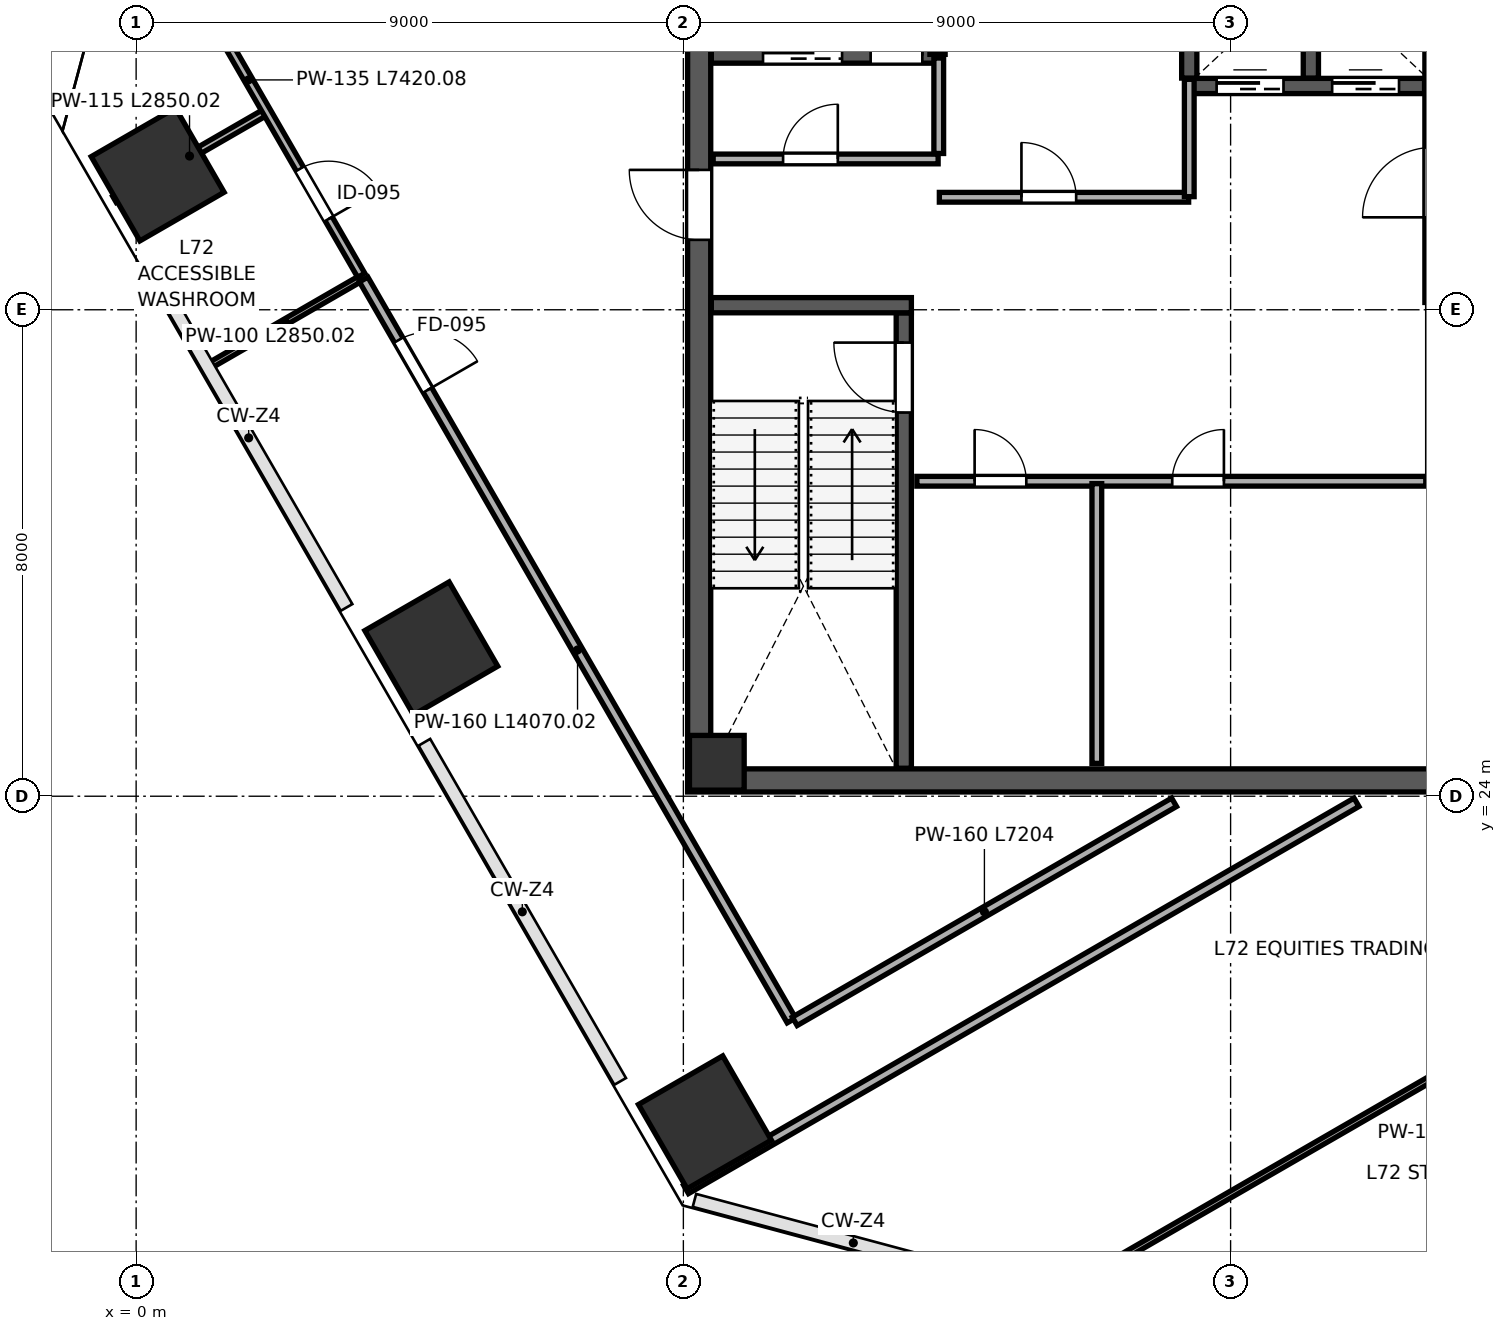
"""IFC4 building model, lengths in metres.
Left out: names, types, materials, properties, quantities, classifications, styles, units other than length and angle.
Written with IfcOpenShell. Run it as: python <this file> out.ifc"""

import sys

from ifc_helpers import new_model, si_unit, direction, frame, frame_2d, origin, origin_2d, place, context, subcontext, project, spatial, rectangle, extrude, source, transform, mapped, element, fill, save


model = new_model("IFC4")
c1 = context("Model", 3, precision=1e-05, world=origin(), true_north=direction((0.0, 1.0)))
c2 = subcontext(c1, "Body", "Model", "MODEL_VIEW")
j1 = project(units=[si_unit("LENGTHUNIT", "METRE"), si_unit("PLANEANGLEUNIT", "RADIAN")], contexts=[c1])
p1 = place(None, origin())
s1 = spatial("IfcSite", under=j1, at=p1, CompositionType="ELEMENT")
p2 = place(p1, origin())
s2 = spatial("IfcBuilding", under=s1, at=p2, CompositionType="ELEMENT")
p3 = place(p2, frame((0.0, 0.0, 319.8)))
s3 = spatial("IfcBuildingStorey", under=s2, at=p3, CompositionType="ELEMENT", Elevation=319.8)
m1 = source(origin(), c2, "Body", "SweptSolid", [
    extrude(rectangle(XDim=0.9, YDim=0.9, at=origin_2d()), origin(), (0.0, 0.0, 1.0), 4.198),
])
p4 = place(p3, frame((9.55, 24.55, 0.001), z_axis=(0.0, 0.0, 1.0), x_axis=(1.0, 0.0, 0.0)))
e1 = element("IfcColumn", 1, at=p4, inside=s3, PredefinedType="COLUMN", context=c2, shape_type="MappedRepresentation", body=[
    mapped(m1, transform((0.0, 0.0, 0.0), scale=1.0)),
])
m2 = source(origin(), c2, "Body", "SweptSolid", [
    extrude(rectangle(XDim=1.6, YDim=1.6, at=origin_2d()), origin(), (0.0, 0.0, 1.0), 4.198),
])
for number, where, z_axis, x_axis in (
    (2, (0.354, 34.225, 0.001), (0.0, 0.0, 1.0), (-0.5, 0.866, 0.0)),
    (3, (4.854, 26.431, 0.001), (0.0, 0.0, 1.0), (-0.5, 0.866, 0.0)),
    (4, (9.354, 18.637, 0.001), (0.0, 0.0, 1.0), (-0.5, 0.866, 0.0)),
    (5, (21.822, 15.443, 0.001), (0.0, 0.0, 1.0), (-0.5, 0.866, 0.0)),
):
    element("IfcColumn", number, at=place(p3, frame(where, z_axis=z_axis, x_axis=x_axis)), inside=s3, PredefinedType="COLUMN", context=c2, shape_type="MappedRepresentation", body=[
        mapped(m2, transform((0.0, 0.0, 0.0), scale=1.0)),
    ])
p5 = place(p3, frame((9.26, 24.45, 0.0), z_axis=(0.0, 0.0, 1.0), x_axis=(0.0, 1.0, 0.0)))
e6 = element("IfcWall", 6, at=p5, inside=s3, PredefinedType="SHEAR", context=c2, shape_type="SweptSolid", body=[
    extrude(rectangle(XDim=15.1, YDim=0.38, at=frame_2d((7.55, 0.0))), origin(), (0.0, 0.0, 1.0), 3.96),
])
p6 = place(p5, frame((8.7, 0.0, 0.0)))
e7 = element("IfcOpeningElement", 7, at=p6, cuts=e6, PredefinedType="OPENING", context=c2, shape_type="SweptSolid", body=[
    extrude(rectangle(XDim=1.15, YDim=2.2, at=frame_2d((0.575, 1.1))), frame((0.0, 0.2, 0.0), z_axis=(0.0, -1.0, 0.0), x_axis=(1.0, 0.0, 0.0)), (0.0, 0.0, 1.0), 0.4),
])
p7 = place(p3, frame((9.07, 24.26, 0.0), z_axis=(0.0, 0.0, 1.0), x_axis=(1.0, 0.0, 0.0)))
e8 = element("IfcWall", 8, at=p7, inside=s3, PredefinedType="SHEAR", context=c2, shape_type="SweptSolid", body=[
    extrude(rectangle(XDim=17.86, YDim=0.38, at=frame_2d((8.93, 0.0))), origin(), (0.0, 0.0, 1.0), 3.96),
])
p8 = place(p3, frame((12.625, 24.46, 0.0), z_axis=(0.0, 0.0, 1.0), x_axis=(0.0, 1.0, 0.0)))
e9 = element("IfcWall", 9, at=p8, inside=s3, PredefinedType="SHEAR", context=c2, shape_type="SweptSolid", body=[
    extrude(rectangle(XDim=7.49, YDim=0.25, at=frame_2d((3.745, 0.0))), origin(), (0.0, 0.0, 1.0), 3.96),
])
p9 = place(p8, frame((5.85, 0.0, 0.0)))
e10 = element("IfcOpeningElement", 10, at=p9, cuts=e9, PredefinedType="OPENING", context=c2, shape_type="SweptSolid", body=[
    extrude(rectangle(XDim=1.15, YDim=2.2, at=frame_2d((0.575, 1.1))), frame((0.0, 0.135, 0.0), z_axis=(0.0, -1.0, 0.0), x_axis=(1.0, 0.0, 0.0)), (0.0, 0.0, 1.0), 0.27),
])
p10 = place(p3, frame((9.46, 32.075, 0.0), z_axis=(0.0, 0.0, 1.0), x_axis=(1.0, 0.0, 0.0)))
e11 = element("IfcWall", 11, at=p10, inside=s3, PredefinedType="SHEAR", context=c2, shape_type="SweptSolid", body=[
    extrude(rectangle(XDim=3.29, YDim=0.25, at=frame_2d((1.645, 0.0))), origin(), (0.0, 0.0, 1.0), 3.96),
])
p11 = place(p3, frame((21.32, 32.12, 0.0), z_axis=(0.0, 0.0, 1.0), x_axis=(0.0, 1.0, 0.0)))
e12 = element("IfcWall", 12, at=p11, inside=s3, PredefinedType="SHEAR", context=c2, shape_type="SweptSolid", body=[
    extrude(rectangle(XDim=7.42, YDim=0.25, at=frame_2d((3.71, 0.0))), origin(), (0.0, 0.0, 1.0), 3.96),
])
p12 = place(p11, frame((1.4, 0.0, 0.0)))
e13 = element("IfcOpeningElement", 13, at=p12, cuts=e12, PredefinedType="OPENING", context=c2, shape_type="SweptSolid", body=[
    extrude(rectangle(XDim=1.15, YDim=2.2, at=frame_2d((0.575, 1.1))), frame((0.0, 0.135, 0.0), z_axis=(0.0, -1.0, 0.0), x_axis=(1.0, 0.0, 0.0)), (0.0, 0.0, 1.0), 0.27),
])
p13 = place(p3, frame((9.46, 36.18, 0.0), z_axis=(0.0, 0.0, 1.0), x_axis=(1.0, 0.0, 0.0)))
e14 = element("IfcWall", 14, at=p13, inside=s3, PredefinedType="SHEAR", context=c2, shape_type="SweptSolid", body=[
    extrude(rectangle(XDim=3.79, YDim=0.25, at=frame_2d((1.895, 0.0))), origin(), (0.0, 0.0, 1.0), 3.96),
])
p14 = place(p13, frame((2.62, 0.0, 0.0)))
e15 = element("IfcOpeningElement", 15, at=p14, cuts=e14, PredefinedType="OPENING", context=c2, shape_type="SweptSolid", body=[
    extrude(rectangle(XDim=0.85, YDim=2.1, at=frame_2d((0.425, 1.05))), frame((0.0, 0.135, 0.0), z_axis=(0.0, -1.0, 0.0), x_axis=(1.0, 0.0, 0.0)), (0.0, 0.0, 1.0), 0.27),
])
p15 = place(p13, frame((0.85, 0.0, 0.0)))
e16 = element("IfcOpeningElement", 16, at=p15, cuts=e14, PredefinedType="OPENING", context=c2, shape_type="SweptSolid", body=[
    extrude(rectangle(XDim=1.3, YDim=2.25, at=frame_2d((0.65, 1.125))), frame((0.0, 0.135, 0.0), z_axis=(0.0, -1.0, 0.0), x_axis=(1.0, 0.0, 0.0)), (0.0, 0.0, 1.0), 0.27),
])
p16 = place(p3, frame((13.18, 36.2, 0.0), z_axis=(0.0, 0.0, 1.0), x_axis=(0.0, 1.0, 0.0)))
e17 = element("IfcWall", 17, at=p16, inside=s3, PredefinedType="SHEAR", context=c2, shape_type="SweptSolid", body=[
    extrude(rectangle(XDim=3.34, YDim=0.25, at=frame_2d((1.67, 0.0))), origin(), (0.0, 0.0, 1.0), 3.96),
])
p17 = place(p3, frame((17.32, 35.68, 0.0), z_axis=(0.0, 0.0, 1.0), x_axis=(1.0, 0.0, 0.0)))
e18 = element("IfcWall", 18, at=p17, inside=s3, PredefinedType="SHEAR", context=c2, shape_type="SweptSolid", body=[
    extrude(rectangle(XDim=3.87, YDim=0.25, at=frame_2d((1.935, 0.0))), origin(), (0.0, 0.0, 1.0), 3.96),
])
p18 = place(p17, frame((0.45, 0.0, 0.0)))
e19 = element("IfcOpeningElement", 19, at=p18, cuts=e18, PredefinedType="OPENING", context=c2, shape_type="SweptSolid", body=[
    extrude(rectangle(XDim=1.1, YDim=2.2, at=frame_2d((0.55, 1.1))), frame((0.0, 0.135, 0.0), z_axis=(0.0, -1.0, 0.0), x_axis=(1.0, 0.0, 0.0)), (0.0, 0.0, 1.0), 0.27),
])
p19 = place(p17, frame((2.35, 0.0, 0.0)))
e20 = element("IfcOpeningElement", 20, at=p19, cuts=e18, PredefinedType="OPENING", context=c2, shape_type="SweptSolid", body=[
    extrude(rectangle(XDim=1.1, YDim=2.2, at=frame_2d((0.55, 1.1))), frame((0.0, 0.135, 0.0), z_axis=(0.0, -1.0, 0.0), x_axis=(1.0, 0.0, 0.0)), (0.0, 0.0, 1.0), 0.27),
])
for number, where, z_axis, x_axis in (
    (21, (17.32, 35.81, 0.0), (0.0, 0.0, 1.0), (0.0, 1.0, 0.0)),
    (22, (19.32, 35.81, 0.0), (0.0, 0.0, 1.0), (0.0, 1.0, 0.0)),
):
    element("IfcWall", number, at=place(p3, frame(where, z_axis=z_axis, x_axis=x_axis)), inside=s3, PredefinedType="SHEAR", context=c2, shape_type="SweptSolid", body=[
        extrude(rectangle(XDim=3.73, YDim=0.25, at=frame_2d((1.865, 0.0))), origin(), (0.0, 0.0, 1.0), 3.96),
    ])
p20 = place(p3, frame((9.49, 34.48, 0.0), z_axis=(0.0, 0.0, 1.0), x_axis=(1.0, 0.0, 0.0)))
e23 = element("IfcWall", 23, at=p20, inside=s3, PredefinedType="PARTITIONING", context=c2, shape_type="SweptSolid", body=[
    extrude(rectangle(XDim=3.7, YDim=0.16, at=frame_2d((1.85, 0.0))), origin(), (0.0, 0.0, 1.0), 3.96),
])
p21 = place(p20, frame((1.15, 0.0, 0.0)))
e24 = element("IfcOpeningElement", 24, at=p21, cuts=e23, PredefinedType="OPENING", context=c2, shape_type="SweptSolid", body=[
    extrude(rectangle(XDim=0.9, YDim=2.15, at=frame_2d((0.45, 1.075))), frame((0.0, 0.09, 0.0), z_axis=(0.0, -1.0, 0.0), x_axis=(1.0, 0.0, 0.0)), (0.0, 0.0, 1.0), 0.18),
])
p22 = place(p3, frame((13.2, 34.57, 0.0), z_axis=(0.0, 0.0, 1.0), x_axis=(0.0, 1.0, 0.0)))
e25 = element("IfcWall", 25, at=p22, inside=s3, PredefinedType="PARTITIONING", context=c2, shape_type="SweptSolid", body=[
    extrude(rectangle(XDim=1.57, YDim=0.16, at=frame_2d((0.785, 0.0))), origin(), (0.0, 0.0, 1.0), 3.96),
])
p23 = place(p3, frame((13.21, 33.85, 0.0), z_axis=(0.0, 0.0, 1.0), x_axis=(1.0, 0.0, 0.0)))
e26 = element("IfcWall", 26, at=p23, inside=s3, PredefinedType="PARTITIONING", context=c2, shape_type="SweptSolid", body=[
    extrude(rectangle(XDim=4.1, YDim=0.16, at=frame_2d((2.05, 0.0))), origin(), (0.0, 0.0, 1.0), 3.96),
])
p24 = place(p23, frame((1.35, 0.0, 0.0)))
e27 = element("IfcOpeningElement", 27, at=p24, cuts=e26, PredefinedType="OPENING", context=c2, shape_type="SweptSolid", body=[
    extrude(rectangle(XDim=0.9, YDim=2.15, at=frame_2d((0.45, 1.075))), frame((0.0, 0.09, 0.0), z_axis=(0.0, -1.0, 0.0), x_axis=(1.0, 0.0, 0.0)), (0.0, 0.0, 1.0), 0.18),
])
p25 = place(p3, frame((17.32, 33.86, 0.0), z_axis=(0.0, 0.0, 1.0), x_axis=(0.0, 1.0, 0.0)))
e28 = element("IfcWall", 28, at=p25, inside=s3, PredefinedType="PARTITIONING", context=c2, shape_type="SweptSolid", body=[
    extrude(rectangle(XDim=1.93, YDim=0.16, at=frame_2d((0.965, 0.0))), origin(), (0.0, 0.0, 1.0), 3.96),
])
p26 = place(p3, frame((12.84, 29.18, 0.0), z_axis=(0.0, 0.0, 1.0), x_axis=(1.0, 0.0, 0.0)))
e29 = element("IfcWall", 29, at=p26, inside=s3, PredefinedType="PARTITIONING", context=c2, shape_type="SweptSolid", body=[
    extrude(rectangle(XDim=8.37, YDim=0.16, at=frame_2d((4.185, 0.0))), origin(), (0.0, 0.0, 1.0), 3.96),
])
p27 = place(p26, frame((0.95, 0.0, 0.0)))
e30 = element("IfcOpeningElement", 30, at=p27, cuts=e29, PredefinedType="OPENING", context=c2, shape_type="SweptSolid", body=[
    extrude(rectangle(XDim=0.85, YDim=2.1, at=frame_2d((0.425, 1.05))), frame((0.0, 0.09, 0.0), z_axis=(0.0, -1.0, 0.0), x_axis=(1.0, 0.0, 0.0)), (0.0, 0.0, 1.0), 0.18),
])
p28 = place(p26, frame((4.2, 0.0, 0.0)))
e31 = element("IfcOpeningElement", 31, at=p28, cuts=e29, PredefinedType="OPENING", context=c2, shape_type="SweptSolid", body=[
    extrude(rectangle(XDim=0.85, YDim=2.1, at=frame_2d((0.425, 1.05))), frame((0.0, 0.09, 0.0), z_axis=(0.0, -1.0, 0.0), x_axis=(1.0, 0.0, 0.0)), (0.0, 0.0, 1.0), 0.18),
])
p29 = place(p3, frame((15.8, 24.54, 0.0), z_axis=(0.0, 0.0, 1.0), x_axis=(0.0, 1.0, 0.0)))
e32 = element("IfcWall", 32, at=p29, inside=s3, PredefinedType="PARTITIONING", context=c2, shape_type="SweptSolid", body=[
    extrude(rectangle(XDim=4.6, YDim=0.16, at=frame_2d((2.3, 0.0))), origin(), (0.0, 0.0, 1.0), 3.96),
])
p30 = place(p3, frame((-0.356, 33.815, 0.0), z_axis=(0.0, 0.0, 1.0), x_axis=(0.866004402611, 0.500036373335, 0.0)))
e33 = element("IfcWall", 33, at=p30, inside=s3, PredefinedType="PARTITIONING", context=c2, shape_type="SweptSolid", body=[
    extrude(rectangle(XDim=2.85, YDim=0.115, at=frame_2d((1.425, 0.0))), origin(), (0.0, 0.0, 1.0), 3.295),
])
p31 = place(p3, frame((1.219, 31.087, 0.0), z_axis=(0.0, 0.0, 1.0), x_axis=(0.866062911188, 0.499935029643, 0.0)))
e34 = element("IfcWall", 34, at=p31, inside=s3, PredefinedType="PARTITIONING", context=c2, shape_type="SweptSolid", body=[
    extrude(rectangle(XDim=2.85, YDim=0.1, at=frame_2d((1.425, 0.0))), origin(), (0.0, 0.0, 1.0), 3.295),
])
p32 = place(p3, frame((-0.008, 38.993, 0.0), z_axis=(0.0, 0.0, 1.0), x_axis=(0.49998923004, -0.866031621735, 0.0)))
e35 = element("IfcWall", 35, at=p32, inside=s3, PredefinedType="PARTITIONING", context=c2, shape_type="SweptSolid", body=[
    extrude(rectangle(XDim=7.42, YDim=0.135, at=frame_2d((3.71, 0.0))), origin(), (0.0, 0.0, 1.0), 3.96),
])
p33 = place(p32, frame((2.1, 0.0, 0.0)))
e36 = element("IfcOpeningElement", 36, at=p33, cuts=e35, PredefinedType="OPENING", context=c2, shape_type="SweptSolid", body=[
    extrude(rectangle(XDim=0.9, YDim=2.15, at=frame_2d((0.45, 1.075))), frame((0.0, 0.078, 0.0), z_axis=(0.0, -1.0, 0.0), x_axis=(1.0, 0.0, 0.0)), (0.0, 0.0, 1.0), 0.155),
])
p34 = place(p32, frame((5.4, 0.0, 0.0)))
e37 = element("IfcOpeningElement", 37, at=p34, cuts=e35, PredefinedType="OPENING", context=c2, shape_type="SweptSolid", body=[
    extrude(rectangle(XDim=0.95, YDim=2.15, at=frame_2d((0.475, 1.075))), frame((0.0, 0.078, 0.0), z_axis=(0.0, -1.0, 0.0), x_axis=(1.0, 0.0, 0.0)), (0.0, 0.0, 1.0), 0.155),
])
p35 = place(p3, frame((3.742, 32.498, 0.0), z_axis=(0.0, 0.0, 1.0), x_axis=(0.500005830994, -0.866022037233, 0.0)))
e38 = element("IfcWall", 38, at=p35, inside=s3, PredefinedType="PARTITIONING", context=c2, shape_type="SweptSolid", body=[
    extrude(rectangle(XDim=14.07, YDim=0.16, at=frame_2d((7.035, 0.0))), origin(), (0.0, 0.0, 1.0), 3.96),
])
p36 = place(p35, frame((1.15, 0.0, 0.0)))
e39 = element("IfcOpeningElement", 39, at=p36, cuts=e38, PredefinedType="OPENING", context=c2, shape_type="SweptSolid", body=[
    extrude(rectangle(XDim=0.95, YDim=2.15, at=frame_2d((0.475, 1.075))), frame((0.0, 0.09, 0.0), z_axis=(0.0, -1.0, 0.0), x_axis=(1.0, 0.0, 0.0)), (0.0, 0.0, 1.0), 0.18),
])
p37 = place(p3, frame((10.832, 20.298, 0.0), z_axis=(0.0, 0.0, 1.0), x_axis=(0.866042809144, 0.499969851821, 0.0)))
e40 = element("IfcWall", 40, at=p37, inside=s3, PredefinedType="PARTITIONING", context=c2, shape_type="SweptSolid", body=[
    extrude(rectangle(XDim=7.204, YDim=0.16, at=frame_2d((3.602, 0.0))), origin(), (0.0, 0.0, 1.0), 3.96),
])
p38 = place(p3, frame((9.044, 17.534, 0.0), z_axis=(0.0, 0.0, 1.0), x_axis=(0.866029119881, 0.499993563477, 0.0)))
e41 = element("IfcWall", 41, at=p38, inside=s3, PredefinedType="PARTITIONING", context=c2, shape_type="SweptSolid", body=[
    extrude(rectangle(XDim=12.732, YDim=0.16, at=frame_2d((6.366, 0.0))), origin(), (0.0, 0.0, 1.0), 3.96),
])
p39 = place(p3, frame((13.917, 15.094, 0.0), z_axis=(0.0, 0.0, 1.0), x_axis=(0.86602564517, 0.499999581907, 0.0)))
e42 = element("IfcWall", 42, at=p39, inside=s3, PredefinedType="PARTITIONING", context=c2, shape_type="SweptSolid", body=[
    extrude(rectangle(XDim=18.48, YDim=0.1, at=frame_2d((9.24, 0.0))), origin(), (0.0, 0.0, 1.0), 3.96),
])
m3 = source(origin(), c2, "Body", "SweptSolid", [
    extrude(rectangle(XDim=1.15, YDim=2.2, at=frame_2d((0.575, 1.1))), frame((0.0, 0.025, 0.0), z_axis=(0.0, -1.0, 0.0), x_axis=(1.0, 0.0, 0.0)), (0.0, 0.0, 1.0), 0.05),
])
p40 = place(p9, origin())
e43 = element("IfcDoor", 43, at=p40, inside=s3, OperationType="SINGLE_SWING_RIGHT", PredefinedType="DOOR", context=c2, shape_type="MappedRepresentation", body=[
    mapped(m3, transform((0.0, 0.0, 0.0), scale=1.0)),
])
fill(e10, e43)
m4 = source(origin(), c2, "Body", "SweptSolid", [
    extrude(rectangle(XDim=1.15, YDim=2.2, at=frame_2d((0.575, 1.1))), frame((0.0, 0.025, 0.0), z_axis=(0.0, -1.0, 0.0), x_axis=(1.0, 0.0, 0.0)), (0.0, 0.0, 1.0), 0.05),
])
p41 = place(p6, origin())
e44 = element("IfcDoor", 44, at=p41, inside=s3, OperationType="SINGLE_SWING_RIGHT", PredefinedType="DOOR", context=c2, shape_type="MappedRepresentation", body=[
    mapped(m4, transform((0.0, 0.0, 0.0), scale=1.0)),
])
fill(e7, e44)
m5 = source(origin(), c2, "Body", "SweptSolid", [
    extrude(rectangle(XDim=0.85, YDim=2.1, at=frame_2d((0.425, 1.05))), frame((0.0, 0.025, 0.0), z_axis=(0.0, -1.0, 0.0), x_axis=(1.0, 0.0, 0.0)), (0.0, 0.0, 1.0), 0.05),
])
p42 = place(p14, origin())
e45 = element("IfcDoor", 45, at=p42, inside=s3, OperationType="SINGLE_SWING_RIGHT", PredefinedType="DOOR", context=c2, shape_type="MappedRepresentation", body=[
    mapped(m5, transform((0.0, 0.0, 0.0), scale=1.0)),
])
fill(e15, e45)
m6 = source(origin(), c2, "Body", "SweptSolid", [
    extrude(rectangle(XDim=1.1, YDim=2.2, at=frame_2d((0.55, 1.1))), frame((0.0, 0.025, 0.0), z_axis=(0.0, -1.0, 0.0), x_axis=(1.0, 0.0, 0.0)), (0.0, 0.0, 1.0), 0.05),
])
p43 = place(p18, origin())
e46 = element("IfcDoor", 46, at=p43, inside=s3, OperationType="SLIDING_TO_LEFT", PredefinedType="DOOR", context=c2, shape_type="MappedRepresentation", body=[
    mapped(m6, transform((0.0, 0.0, 0.0), scale=1.0)),
])
fill(e19, e46)
p44 = place(p19, origin())
e47 = element("IfcDoor", 47, at=p44, inside=s3, OperationType="SLIDING_TO_RIGHT", PredefinedType="DOOR", context=c2, shape_type="MappedRepresentation", body=[
    mapped(m6, transform((0.0, 0.0, 0.0), scale=1.0)),
])
fill(e20, e47)
m7 = source(origin(), c2, "Body", "SweptSolid", [
    extrude(rectangle(XDim=1.3, YDim=2.25, at=frame_2d((0.65, 1.125))), frame((0.0, 0.025, 0.0), z_axis=(0.0, -1.0, 0.0), x_axis=(1.0, 0.0, 0.0)), (0.0, 0.0, 1.0), 0.05),
])
p45 = place(p15, origin())
e48 = element("IfcDoor", 48, at=p45, inside=s3, OperationType="SLIDING_TO_LEFT", PredefinedType="DOOR", context=c2, shape_type="MappedRepresentation", body=[
    mapped(m7, transform((0.0, 0.0, 0.0), scale=1.0)),
])
fill(e16, e48)
m8 = source(origin(), c2, "Body", "SweptSolid", [
    extrude(rectangle(XDim=0.9, YDim=2.15, at=frame_2d((0.45, 1.075))), frame((0.0, 0.025, 0.0), z_axis=(0.0, -1.0, 0.0), x_axis=(1.0, 0.0, 0.0)), (0.0, 0.0, 1.0), 0.05),
])
p46 = place(p21, origin())
e49 = element("IfcDoor", 49, at=p46, inside=s3, OperationType="SINGLE_SWING_RIGHT", PredefinedType="DOOR", context=c2, shape_type="MappedRepresentation", body=[
    mapped(m8, transform((0.0, 0.0, 0.0), scale=1.0)),
])
fill(e24, e49)
p47 = place(p24, origin())
e50 = element("IfcDoor", 50, at=p47, inside=s3, OperationType="SINGLE_SWING_LEFT", PredefinedType="DOOR", context=c2, shape_type="MappedRepresentation", body=[
    mapped(m8, transform((0.0, 0.0, 0.0), scale=1.0)),
])
fill(e27, e50)
p48 = place(p27, origin())
e51 = element("IfcDoor", 51, at=p48, inside=s3, OperationType="SINGLE_SWING_LEFT", PredefinedType="DOOR", context=c2, shape_type="MappedRepresentation", body=[
    mapped(m5, transform((0.0, 0.0, 0.0), scale=1.0)),
])
fill(e30, e51)
p49 = place(p28, origin())
e52 = element("IfcDoor", 52, at=p49, inside=s3, OperationType="SINGLE_SWING_RIGHT", PredefinedType="DOOR", context=c2, shape_type="MappedRepresentation", body=[
    mapped(m5, transform((0.0, 0.0, 0.0), scale=1.0)),
])
fill(e31, e52)
m9 = source(origin(), c2, "Body", "SweptSolid", [
    extrude(rectangle(XDim=0.95, YDim=2.15, at=frame_2d((0.475, 1.075))), frame((0.0, 0.025, 0.0), z_axis=(0.0, -1.0, 0.0), x_axis=(1.0, 0.0, 0.0)), (0.0, 0.0, 1.0), 0.05),
])
p50 = place(p34, origin())
e53 = element("IfcDoor", 53, at=p50, inside=s3, OperationType="SINGLE_SWING_RIGHT", PredefinedType="DOOR", context=c2, shape_type="MappedRepresentation", body=[
    mapped(m9, transform((0.0, 0.0, 0.0), scale=1.0)),
])
fill(e37, e53)
m10 = source(origin(), c2, "Body", "SweptSolid", [
    extrude(rectangle(XDim=0.95, YDim=2.15, at=frame_2d((0.475, 1.075))), frame((0.0, 0.025, 0.0), z_axis=(0.0, -1.0, 0.0), x_axis=(1.0, 0.0, 0.0)), (0.0, 0.0, 1.0), 0.05),
])
p51 = place(p36, origin())
e54 = element("IfcDoor", 54, at=p51, inside=s3, OperationType="SINGLE_SWING_RIGHT", PredefinedType="DOOR", context=c2, shape_type="MappedRepresentation", body=[
    mapped(m10, transform((0.0, 0.0, 0.0), scale=1.0)),
])
fill(e39, e54)
save(model, sys.argv[1])
